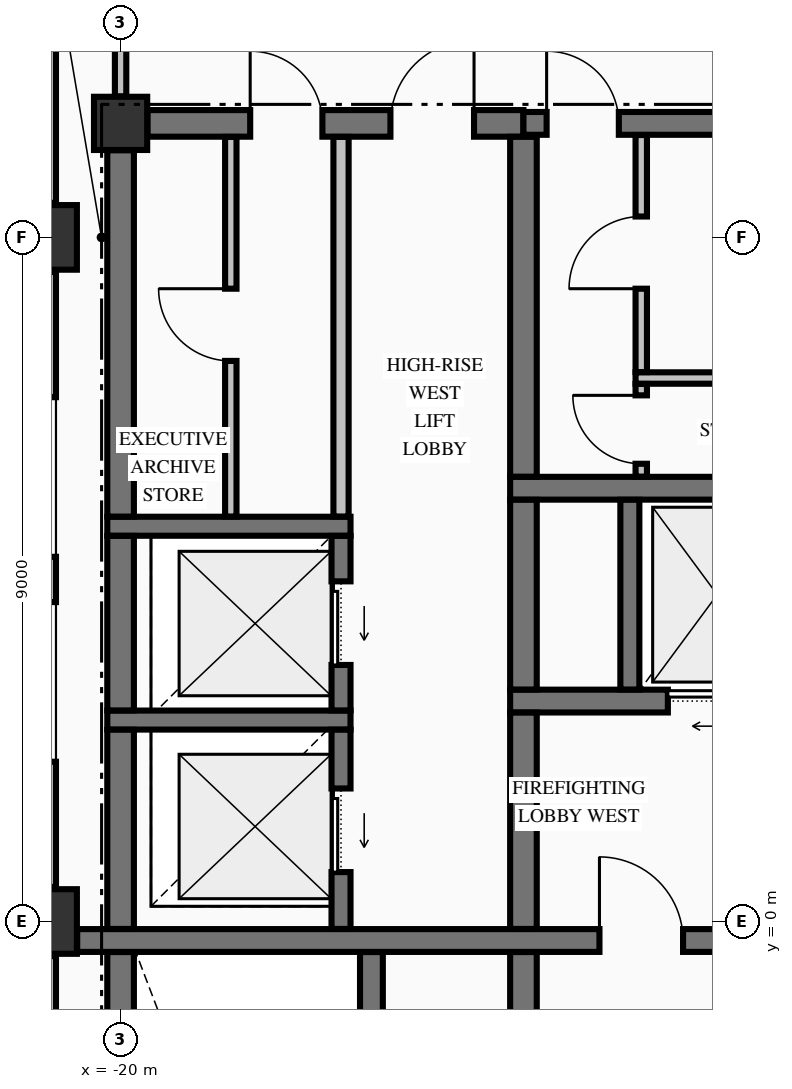
"""IFC4 building model, lengths in metres.
Left out: names, types, materials, properties, quantities, classifications, styles, units other than length and angle.
Written with IfcOpenShell. Run it as: python <this file> out.ifc"""

import sys

from ifc_helpers import new_model, si_unit, direction, frame, frame_2d, origin, origin_2d, place, context, subcontext, project, spatial, rectangle, extrude, element, fill, save


model = new_model("IFC4")
c1 = context("Model", 3, precision=1e-05, world=origin(), true_north=direction((0.0, 1.0)))
c2 = subcontext(c1, "Body", "Model", "MODEL_VIEW")
j1 = project(units=[si_unit("LENGTHUNIT", "METRE"), si_unit("PLANEANGLEUNIT", "RADIAN")], contexts=[c1])
p1 = place(None, origin())
s1 = spatial("IfcSite", under=j1, at=p1, CompositionType="ELEMENT")
p2 = place(p1, origin())
s2 = spatial("IfcBuilding", under=s1, at=p2, CompositionType="ELEMENT")
p3 = place(p2, frame((0.0, 0.0, 233.28)))
s3 = spatial("IfcBuildingStorey", under=s2, at=p3, CompositionType="ELEMENT", Elevation=233.28)
for number, where, z_axis, x_axis in (
    (1, (-21.0, 0.0, -0.25), (0.0, 0.0, 1.0), (1.0, 0.0, 0.0)),
    (2, (-21.0, 9.0, -0.25), (0.0, 0.0, 1.0), (1.0, 0.0, 0.0)),
):
    element("IfcColumn", number, at=place(p3, frame(where, z_axis=z_axis, x_axis=x_axis)), inside=s3, PredefinedType="COLUMN", context=c2, shape_type="SweptSolid", body=[
        extrude(rectangle(XDim=0.85, YDim=0.85, at=origin_2d()), origin(), (0.0, 0.0, 1.0), 3.23),
    ])
p4 = place(p3, frame((-20.0, 10.5, -0.25), z_axis=(0.0, 0.0, 1.0), x_axis=(1.0, 0.0, 0.0)))
e3 = element("IfcColumn", 3, at=p4, inside=s3, PredefinedType="COLUMN", context=c2, shape_type="SweptSolid", body=[
    extrude(rectangle(XDim=0.7, YDim=0.7, at=origin_2d()), origin(), (0.0, 0.0, 1.0), 3.23),
])
p5 = place(p3, frame((-21.0, -0.455, 0.0), z_axis=(0.0, 0.0, 1.0), x_axis=(0.0, -1.0, 0.0)))
e4 = element("IfcWall", 4, at=p5, inside=s3, PredefinedType="STANDARD", context=c2, shape_type="SweptSolid", body=[
    extrude(rectangle(XDim=8.09, YDim=0.3, at=frame_2d((4.045, 0.0))), origin(), (0.0, 0.0, 1.0), 2.372),
])
p6 = place(p5, frame((1.647, 0.0, 0.7)))
e5 = element("IfcOpeningElement", 5, at=p6, cuts=e4, PredefinedType="OPENING", context=c2, shape_type="SweptSolid", body=[
    extrude(rectangle(XDim=2.1, YDim=1.5, at=frame_2d((1.05, 0.75))), frame((0.0, 0.16, 0.0), z_axis=(0.0, -1.0, 0.0), x_axis=(1.0, 0.0, 0.0)), (0.0, 0.0, 1.0), 0.32),
])
p7 = place(p5, frame((4.343, 0.0, 0.7)))
e6 = element("IfcOpeningElement", 6, at=p7, cuts=e4, PredefinedType="OPENING", context=c2, shape_type="SweptSolid", body=[
    extrude(rectangle(XDim=2.1, YDim=1.5, at=frame_2d((1.05, 0.75))), frame((0.0, 0.16, 0.0), z_axis=(0.0, -1.0, 0.0), x_axis=(1.0, 0.0, 0.0)), (0.0, 0.0, 1.0), 0.32),
])
p8 = place(p3, frame((-21.0, 8.545, 0.0), z_axis=(0.0, 0.0, 1.0), x_axis=(0.0, -1.0, 0.0)))
e7 = element("IfcWall", 7, at=p8, inside=s3, PredefinedType="STANDARD", context=c2, shape_type="SweptSolid", body=[
    extrude(rectangle(XDim=8.09, YDim=0.3, at=frame_2d((4.045, 0.0))), origin(), (0.0, 0.0, 1.0), 2.372),
])
p9 = place(p8, frame((1.647, 0.0, 0.7)))
e8 = element("IfcOpeningElement", 8, at=p9, cuts=e7, PredefinedType="OPENING", context=c2, shape_type="SweptSolid", body=[
    extrude(rectangle(XDim=2.1, YDim=1.5, at=frame_2d((1.05, 0.75))), frame((0.0, 0.16, 0.0), z_axis=(0.0, -1.0, 0.0), x_axis=(1.0, 0.0, 0.0)), (0.0, 0.0, 1.0), 0.32),
])
p10 = place(p8, frame((4.343, 0.0, 0.7)))
e9 = element("IfcOpeningElement", 9, at=p10, cuts=e7, PredefinedType="OPENING", context=c2, shape_type="SweptSolid", body=[
    extrude(rectangle(XDim=2.1, YDim=1.5, at=frame_2d((1.05, 0.75))), frame((0.0, 0.16, 0.0), z_axis=(0.0, -1.0, 0.0), x_axis=(1.0, 0.0, 0.0)), (0.0, 0.0, 1.0), 0.32),
])
p11 = place(p3, frame((-21.0, 17.545, 0.0), z_axis=(0.0, 0.0, 1.0), x_axis=(0.0, -1.0, 0.0)))
e10 = element("IfcWall", 10, at=p11, inside=s3, PredefinedType="STANDARD", context=c2, shape_type="SweptSolid", body=[
    extrude(rectangle(XDim=8.09, YDim=0.3, at=frame_2d((4.045, 0.0))), origin(), (0.0, 0.0, 1.0), 2.372),
])
p12 = place(p3, frame((-20.571, -0.25, 0.0), z_axis=(0.0, 0.0, 1.0), x_axis=(1.0, 0.0, 0.0)))
e11 = element("IfcWall", 11, at=p12, inside=s3, PredefinedType="SHEAR", context=c2, shape_type="SweptSolid", body=[
    extrude(rectangle(XDim=9.217, YDim=0.3, at=frame_2d((4.608, 0.0))), origin(), (0.0, 0.0, 1.0), 2.98),
])
p13 = place(p12, frame((6.871, 0.0, 0.0)))
e12 = element("IfcOpeningElement", 12, at=p13, cuts=e11, PredefinedType="OPENING", context=c2, shape_type="SweptSolid", body=[
    extrude(rectangle(XDim=1.1, YDim=2.15, at=frame_2d((0.55, 1.075))), frame((0.0, 0.16, 0.0), z_axis=(0.0, -1.0, 0.0), x_axis=(1.0, 0.0, 0.0)), (0.0, 0.0, 1.0), 0.32),
])
p14 = place(p3, frame((-20.175, 2.65, 0.0), z_axis=(0.0, 0.0, 1.0), x_axis=(1.0, 0.0, 0.0)))
e13 = element("IfcWall", 13, at=p14, inside=s3, PredefinedType="SOLIDWALL", context=c2, shape_type="SweptSolid", body=[
    extrude(rectangle(XDim=3.2, YDim=0.25, at=frame_2d((1.6, 0.0))), origin(), (0.0, 0.0, 1.0), 2.98),
])
p15 = place(p3, frame((-14.875, 2.9, 0.0), z_axis=(0.0, 0.0, 1.0), x_axis=(1.0, 0.0, 0.0)))
e14 = element("IfcWall", 14, at=p15, inside=s3, PredefinedType="SHEAR", context=c2, shape_type="SweptSolid", body=[
    extrude(rectangle(XDim=4.025, YDim=0.3, at=frame_2d((2.012, 0.0))), origin(), (0.0, 0.0, 1.0), 2.98),
])
p16 = place(p15, frame((2.075, 0.0, 0.0)))
e15 = element("IfcOpeningElement", 15, at=p16, cuts=e14, PredefinedType="OPENING", context=c2, shape_type="SweptSolid", body=[
    extrude(rectangle(XDim=1.1, YDim=2.2, at=frame_2d((0.55, 1.1))), frame((0.0, 0.16, 0.0), z_axis=(0.0, -1.0, 0.0), x_axis=(1.0, 0.0, 0.0)), (0.0, 0.0, 1.0), 0.32),
])
p17 = place(p3, frame((-20.175, 5.2, 0.0), z_axis=(0.0, 0.0, 1.0), x_axis=(1.0, 0.0, 0.0)))
e16 = element("IfcWall", 16, at=p17, inside=s3, PredefinedType="SOLIDWALL", context=c2, shape_type="SweptSolid", body=[
    extrude(rectangle(XDim=3.2, YDim=0.25, at=frame_2d((1.6, 0.0))), origin(), (0.0, 0.0, 1.0), 2.98),
])
p18 = place(p3, frame((-14.875, 5.7, 0.0), z_axis=(0.0, 0.0, 1.0), x_axis=(1.0, 0.0, 0.0)))
e17 = element("IfcWall", 17, at=p18, inside=s3, PredefinedType="SHEAR", context=c2, shape_type="SweptSolid", body=[
    extrude(rectangle(XDim=4.025, YDim=0.3, at=frame_2d((2.012, 0.0))), origin(), (0.0, 0.0, 1.0), 2.98),
])
p19 = place(p3, frame((-19.646, 10.5, 0.0), z_axis=(0.0, 0.0, 1.0), x_axis=(1.0, 0.0, 0.0)))
e18 = element("IfcWall", 18, at=p19, inside=s3, PredefinedType="SHEAR", context=c2, shape_type="SweptSolid", body=[
    extrude(rectangle(XDim=4.946, YDim=0.35, at=frame_2d((2.473, 0.0))), origin(), (0.0, 0.0, 1.0), 2.98),
])
p20 = place(p19, frame((3.196, 0.0, 0.0)))
e19 = element("IfcOpeningElement", 19, at=p20, cuts=e18, PredefinedType="OPENING", context=c2, shape_type="SweptSolid", body=[
    extrude(rectangle(XDim=1.1, YDim=2.15, at=frame_2d((0.55, 1.075))), frame((0.0, 0.185, 0.0), z_axis=(0.0, -1.0, 0.0), x_axis=(1.0, 0.0, 0.0)), (0.0, 0.0, 1.0), 0.37),
])
p21 = place(p19, frame((1.351, 0.0, 0.0)))
e20 = element("IfcOpeningElement", 20, at=p21, cuts=e18, PredefinedType="OPENING", context=c2, shape_type="SweptSolid", body=[
    extrude(rectangle(XDim=0.95, YDim=2.15, at=frame_2d((0.475, 1.075))), frame((0.0, 0.185, 0.0), z_axis=(0.0, -1.0, 0.0), x_axis=(1.0, 0.0, 0.0)), (0.0, 0.0, 1.0), 0.37),
])
p22 = place(p3, frame((-14.7, 10.5, 0.0), z_axis=(0.0, 0.0, 1.0), x_axis=(1.0, 0.0, 0.0)))
e21 = element("IfcWall", 21, at=p22, inside=s3, PredefinedType="SHEAR", context=c2, shape_type="SweptSolid", body=[
    extrude(rectangle(XDim=3.346, YDim=0.3, at=frame_2d((1.673, 0.0))), origin(), (0.0, 0.0, 1.0), 2.98),
])
p23 = place(p22, frame((0.305, 0.0, 0.0)))
e22 = element("IfcOpeningElement", 22, at=p23, cuts=e21, PredefinedType="OPENING", context=c2, shape_type="SweptSolid", body=[
    extrude(rectangle(XDim=0.95, YDim=2.15, at=frame_2d((0.475, 1.075))), frame((0.0, 0.16, 0.0), z_axis=(0.0, -1.0, 0.0), x_axis=(1.0, 0.0, 0.0)), (0.0, 0.0, 1.0), 0.32),
])
p24 = place(p3, frame((-13.225, 7.15, 0.0), z_axis=(0.0, 0.0, 1.0), x_axis=(1.0, 0.0, 0.0)))
e23 = element("IfcWall", 23, at=p24, inside=s3, PredefinedType="PARTITIONING", context=c2, shape_type="SweptSolid", body=[
    extrude(rectangle(XDim=2.072, YDim=0.15, at=frame_2d((1.036, 0.0))), origin(), (0.0, 0.0, 1.0), 2.98),
])
p25 = place(p3, frame((-20.0, -9.596, 0.0), z_axis=(0.0, 0.0, 1.0), x_axis=(0.0, 1.0, 0.0)))
e24 = element("IfcWall", 24, at=p25, inside=s3, PredefinedType="SHEAR", context=c2, shape_type="SweptSolid", body=[
    extrude(rectangle(XDim=9.194, YDim=0.35, at=frame_2d((4.597, 0.0))), origin(), (0.0, 0.0, 1.0), 2.98),
])
p26 = place(p3, frame((-20.0, -0.098, 0.0), z_axis=(0.0, 0.0, 1.0), x_axis=(0.0, 1.0, 0.0)))
e25 = element("IfcWall", 25, at=p26, inside=s3, PredefinedType="SHEAR", context=c2, shape_type="SweptSolid", body=[
    extrude(rectangle(XDim=2.621, YDim=0.35, at=frame_2d((1.311, 0.0))), origin(), (0.0, 0.0, 1.0), 2.98),
])
p27 = place(p3, frame((-20.0, 2.777, 0.0), z_axis=(0.0, 0.0, 1.0), x_axis=(0.0, 1.0, 0.0)))
e26 = element("IfcWall", 26, at=p27, inside=s3, PredefinedType="SHEAR", context=c2, shape_type="SweptSolid", body=[
    extrude(rectangle(XDim=2.296, YDim=0.35, at=frame_2d((1.148, 0.0))), origin(), (0.0, 0.0, 1.0), 2.98),
])
p28 = place(p3, frame((-20.0, 5.327, 0.0), z_axis=(0.0, 0.0, 1.0), x_axis=(0.0, 1.0, 0.0)))
e27 = element("IfcWall", 27, at=p28, inside=s3, PredefinedType="SHEAR", context=c2, shape_type="SweptSolid", body=[
    extrude(rectangle(XDim=4.819, YDim=0.35, at=frame_2d((2.41, 0.0))), origin(), (0.0, 0.0, 1.0), 2.98),
])
p29 = place(p3, frame((-17.1, -0.098, 0.0), z_axis=(0.0, 0.0, 1.0), x_axis=(0.0, 1.0, 0.0)))
e28 = element("IfcWall", 28, at=p29, inside=s3, PredefinedType="SOLIDWALL", context=c2, shape_type="SweptSolid", body=[
    extrude(rectangle(XDim=2.621, YDim=0.25, at=frame_2d((1.311, 0.0))), origin(), (0.0, 0.0, 1.0), 2.98),
])
p30 = place(p29, frame((0.748, 0.0, 0.0)))
e29 = element("IfcOpeningElement", 29, at=p30, cuts=e28, PredefinedType="OPENING", context=c2, shape_type="SweptSolid", body=[
    extrude(rectangle(XDim=1.1, YDim=2.2, at=frame_2d((0.55, 1.1))), frame((0.0, 0.135, 0.0), z_axis=(0.0, -1.0, 0.0), x_axis=(1.0, 0.0, 0.0)), (0.0, 0.0, 1.0), 0.27),
])
p31 = place(p3, frame((-17.1, 2.777, 0.0), z_axis=(0.0, 0.0, 1.0), x_axis=(0.0, 1.0, 0.0)))
e30 = element("IfcWall", 30, at=p31, inside=s3, PredefinedType="SOLIDWALL", context=c2, shape_type="SweptSolid", body=[
    extrude(rectangle(XDim=2.296, YDim=0.25, at=frame_2d((1.148, 0.0))), origin(), (0.0, 0.0, 1.0), 2.98),
])
p32 = place(p31, frame((0.598, 0.0, 0.0)))
e31 = element("IfcOpeningElement", 31, at=p32, cuts=e30, PredefinedType="OPENING", context=c2, shape_type="SweptSolid", body=[
    extrude(rectangle(XDim=1.1, YDim=2.2, at=frame_2d((0.55, 1.1))), frame((0.0, 0.135, 0.0), z_axis=(0.0, -1.0, 0.0), x_axis=(1.0, 0.0, 0.0)), (0.0, 0.0, 1.0), 0.27),
])
p33 = place(p3, frame((-16.7, -9.773, 0.0), z_axis=(0.0, 0.0, 1.0), x_axis=(0.0, 1.0, 0.0)))
e32 = element("IfcWall", 32, at=p33, inside=s3, PredefinedType="SHEAR", context=c2, shape_type="SweptSolid", body=[
    extrude(rectangle(XDim=9.371, YDim=0.3, at=frame_2d((4.686, 0.0))), origin(), (0.0, 0.0, 1.0), 2.98),
])
p34 = place(p3, frame((-14.7, -9.773, 0.0), z_axis=(0.0, 0.0, 1.0), x_axis=(0.0, 1.0, 0.0)))
e33 = element("IfcWall", 33, at=p34, inside=s3, PredefinedType="SHEAR", context=c2, shape_type="SweptSolid", body=[
    extrude(rectangle(XDim=9.371, YDim=0.35, at=frame_2d((4.686, 0.0))), origin(), (0.0, 0.0, 1.0), 2.98),
])
p35 = place(p3, frame((-14.7, -0.098, 0.0), z_axis=(0.0, 0.0, 1.0), x_axis=(0.0, 1.0, 0.0)))
e34 = element("IfcWall", 34, at=p35, inside=s3, PredefinedType="SHEAR", context=c2, shape_type="SweptSolid", body=[
    extrude(rectangle(XDim=2.846, YDim=0.35, at=frame_2d((1.423, 0.0))), origin(), (0.0, 0.0, 1.0), 2.98),
])
p36 = place(p3, frame((-14.7, 3.052, 0.0), z_axis=(0.0, 0.0, 1.0), x_axis=(0.0, 1.0, 0.0)))
e35 = element("IfcWall", 35, at=p36, inside=s3, PredefinedType="SHEAR", context=c2, shape_type="SweptSolid", body=[
    extrude(rectangle(XDim=2.496, YDim=0.35, at=frame_2d((1.248, 0.0))), origin(), (0.0, 0.0, 1.0), 2.98),
])
p37 = place(p3, frame((-14.7, 5.852, 0.0), z_axis=(0.0, 0.0, 1.0), x_axis=(0.0, 1.0, 0.0)))
e36 = element("IfcWall", 36, at=p37, inside=s3, PredefinedType="SHEAR", context=c2, shape_type="SweptSolid", body=[
    extrude(rectangle(XDim=4.471, YDim=0.35, at=frame_2d((2.235, 0.0))), origin(), (0.0, 0.0, 1.0), 2.98),
])
p38 = place(p3, frame((-13.3, 3.052, 0.0), z_axis=(0.0, 0.0, 1.0), x_axis=(0.0, 1.0, 0.0)))
e37 = element("IfcWall", 37, at=p38, inside=s3, PredefinedType="SOLIDWALL", context=c2, shape_type="SweptSolid", body=[
    extrude(rectangle(XDim=2.496, YDim=0.25, at=frame_2d((1.248, 0.0))), origin(), (0.0, 0.0, 1.0), 2.98),
])
p39 = place(p3, frame((-20.0, 10.856, 0.0), z_axis=(0.0, 0.0, 1.0), x_axis=(0.0, 1.0, 0.0)))
e38 = element("IfcWall", 38, at=p39, inside=s3, PredefinedType="PARTITIONING", context=c2, shape_type="SweptSolid", body=[
    extrude(rectangle(XDim=2.666, YDim=0.15, at=frame_2d((1.333, 0.0))), origin(), (0.0, 0.0, 1.0), 2.57),
])
p40 = place(p3, frame((-18.55, 5.328, 0.0), z_axis=(0.0, 0.0, 1.0), x_axis=(0.0, 1.0, 0.0)))
e39 = element("IfcWall", 39, at=p40, inside=s3, PredefinedType="PARTITIONING", context=c2, shape_type="SweptSolid", body=[
    extrude(rectangle(XDim=4.994, YDim=0.15, at=frame_2d((2.497, 0.0))), origin(), (0.0, 0.0, 1.0), 2.98),
])
p41 = place(p40, frame((2.047, 0.0, 0.0)))
e40 = element("IfcOpeningElement", 40, at=p41, cuts=e39, PredefinedType="OPENING", context=c2, shape_type="SweptSolid", body=[
    extrude(rectangle(XDim=0.95, YDim=2.15, at=frame_2d((0.475, 1.075))), frame((0.0, 0.085, 0.0), z_axis=(0.0, -1.0, 0.0), x_axis=(1.0, 0.0, 0.0)), (0.0, 0.0, 1.0), 0.17),
])
p42 = place(p3, frame((-17.1, 5.328, 0.0), z_axis=(0.0, 0.0, 1.0), x_axis=(0.0, 1.0, 0.0)))
e41 = element("IfcWall", 41, at=p42, inside=s3, PredefinedType="PARTITIONING", context=c2, shape_type="SweptSolid", body=[
    extrude(rectangle(XDim=4.994, YDim=0.2, at=frame_2d((2.497, 0.0))), origin(), (0.0, 0.0, 1.0), 2.98),
])
p43 = place(p3, frame((-13.15, 5.853, 0.0), z_axis=(0.0, 0.0, 1.0), x_axis=(0.0, 1.0, 0.0)))
e42 = element("IfcWall", 42, at=p43, inside=s3, PredefinedType="PARTITIONING", context=c2, shape_type="SweptSolid", body=[
    extrude(rectangle(XDim=1.219, YDim=0.15, at=frame_2d((0.609, 0.0))), origin(), (0.0, 0.0, 1.0), 2.98),
])
p44 = place(p43, frame((0.169, 0.0, 0.0)))
e43 = element("IfcOpeningElement", 43, at=p44, cuts=e42, PredefinedType="OPENING", context=c2, shape_type="SweptSolid", body=[
    extrude(rectangle(XDim=0.9, YDim=2.15, at=frame_2d((0.45, 1.075))), frame((0.0, 0.085, 0.0), z_axis=(0.0, -1.0, 0.0), x_axis=(1.0, 0.0, 0.0)), (0.0, 0.0, 1.0), 0.17),
])
p45 = place(p3, frame((-13.15, 7.228, 0.0), z_axis=(0.0, 0.0, 1.0), x_axis=(0.0, 1.0, 0.0)))
e44 = element("IfcWall", 44, at=p45, inside=s3, PredefinedType="PARTITIONING", context=c2, shape_type="SweptSolid", body=[
    extrude(rectangle(XDim=3.119, YDim=0.15, at=frame_2d((1.56, 0.0))), origin(), (0.0, 0.0, 1.0), 2.98),
])
p46 = place(p45, frame((1.097, 0.0, 0.0)))
e45 = element("IfcOpeningElement", 45, at=p46, cuts=e44, PredefinedType="OPENING", context=c2, shape_type="SweptSolid", body=[
    extrude(rectangle(XDim=0.95, YDim=2.15, at=frame_2d((0.475, 1.075))), frame((0.0, 0.085, 0.0), z_axis=(0.0, -1.0, 0.0), x_axis=(1.0, 0.0, 0.0)), (0.0, 0.0, 1.0), 0.17),
])
p47 = place(p13, origin())
e46 = element("IfcDoor", 46, at=p47, inside=s3, OperationType="SINGLE_SWING_LEFT", PredefinedType="DOOR", context=c2, shape_type="SweptSolid", body=[
    extrude(rectangle(XDim=1.1, YDim=2.15, at=frame_2d((0.55, 1.075))), frame((0.0, 0.025, 0.0), z_axis=(0.0, -1.0, 0.0), x_axis=(1.0, 0.0, 0.0)), (0.0, 0.0, 1.0), 0.05),
])
fill(e12, e46)
p48 = place(p16, origin())
e47 = element("IfcDoor", 47, at=p48, inside=s3, OperationType="SLIDING_TO_LEFT", PredefinedType="DOOR", context=c2, shape_type="SweptSolid", body=[
    extrude(rectangle(XDim=1.1, YDim=2.2, at=frame_2d((0.55, 1.1))), frame((0.0, 0.025, 0.0), z_axis=(0.0, -1.0, 0.0), x_axis=(1.0, 0.0, 0.0)), (0.0, 0.0, 1.0), 0.05),
])
fill(e15, e47)
p49 = place(p23, origin())
e48 = element("IfcDoor", 48, at=p49, inside=s3, OperationType="SINGLE_SWING_LEFT", PredefinedType="DOOR", context=c2, shape_type="SweptSolid", body=[
    extrude(rectangle(XDim=0.95, YDim=2.15, at=frame_2d((0.475, 1.075))), frame((0.0, 0.025, 0.0), z_axis=(0.0, -1.0, 0.0), x_axis=(1.0, 0.0, 0.0)), (0.0, 0.0, 1.0), 0.05),
])
fill(e22, e48)
p50 = place(p44, origin())
e49 = element("IfcDoor", 49, at=p50, inside=s3, OperationType="SINGLE_SWING_RIGHT", PredefinedType="DOOR", context=c2, shape_type="SweptSolid", body=[
    extrude(rectangle(XDim=0.9, YDim=2.15, at=frame_2d((0.45, 1.075))), frame((0.0, 0.025, 0.0), z_axis=(0.0, -1.0, 0.0), x_axis=(1.0, 0.0, 0.0)), (0.0, 0.0, 1.0), 0.05),
])
fill(e43, e49)
p51 = place(p46, origin())
e50 = element("IfcDoor", 50, at=p51, inside=s3, OperationType="SINGLE_SWING_LEFT", PredefinedType="DOOR", context=c2, shape_type="SweptSolid", body=[
    extrude(rectangle(XDim=0.95, YDim=2.15, at=frame_2d((0.475, 1.075))), frame((0.0, 0.025, 0.0), z_axis=(0.0, -1.0, 0.0), x_axis=(1.0, 0.0, 0.0)), (0.0, 0.0, 1.0), 0.05),
])
fill(e45, e50)
p52 = place(p30, origin())
e51 = element("IfcDoor", 51, at=p52, inside=s3, OperationType="SLIDING_TO_LEFT", PredefinedType="DOOR", context=c2, shape_type="SweptSolid", body=[
    extrude(rectangle(XDim=1.1, YDim=2.2, at=frame_2d((0.55, 1.1))), frame((0.0, 0.025, 0.0), z_axis=(0.0, -1.0, 0.0), x_axis=(1.0, 0.0, 0.0)), (0.0, 0.0, 1.0), 0.05),
])
fill(e29, e51)
p53 = place(p32, origin())
e52 = element("IfcDoor", 52, at=p53, inside=s3, OperationType="SLIDING_TO_LEFT", PredefinedType="DOOR", context=c2, shape_type="SweptSolid", body=[
    extrude(rectangle(XDim=1.1, YDim=2.2, at=frame_2d((0.55, 1.1))), frame((0.0, 0.025, 0.0), z_axis=(0.0, -1.0, 0.0), x_axis=(1.0, 0.0, 0.0)), (0.0, 0.0, 1.0), 0.05),
])
fill(e31, e52)
p54 = place(p20, origin())
e53 = element("IfcDoor", 53, at=p54, inside=s3, OperationType="SINGLE_SWING_RIGHT", PredefinedType="DOOR", context=c2, shape_type="SweptSolid", body=[
    extrude(rectangle(XDim=1.1, YDim=2.15, at=frame_2d((0.55, 1.075))), frame((0.0, 0.025, 0.0), z_axis=(0.0, -1.0, 0.0), x_axis=(1.0, 0.0, 0.0)), (0.0, 0.0, 1.0), 0.05),
])
fill(e19, e53)
p55 = place(p21, origin())
e54 = element("IfcDoor", 54, at=p55, inside=s3, OperationType="SINGLE_SWING_LEFT", PredefinedType="DOOR", context=c2, shape_type="SweptSolid", body=[
    extrude(rectangle(XDim=0.95, YDim=2.15, at=frame_2d((0.475, 1.075))), frame((0.0, 0.025, 0.0), z_axis=(0.0, -1.0, 0.0), x_axis=(1.0, 0.0, 0.0)), (0.0, 0.0, 1.0), 0.05),
])
fill(e20, e54)
p56 = place(p41, origin())
e55 = element("IfcDoor", 55, at=p56, inside=s3, OperationType="SINGLE_SWING_RIGHT", PredefinedType="DOOR", context=c2, shape_type="SweptSolid", body=[
    extrude(rectangle(XDim=0.95, YDim=2.15, at=frame_2d((0.475, 1.075))), frame((0.0, 0.025, 0.0), z_axis=(0.0, -1.0, 0.0), x_axis=(1.0, 0.0, 0.0)), (0.0, 0.0, 1.0), 0.05),
])
fill(e40, e55)
save(model, sys.argv[1])
